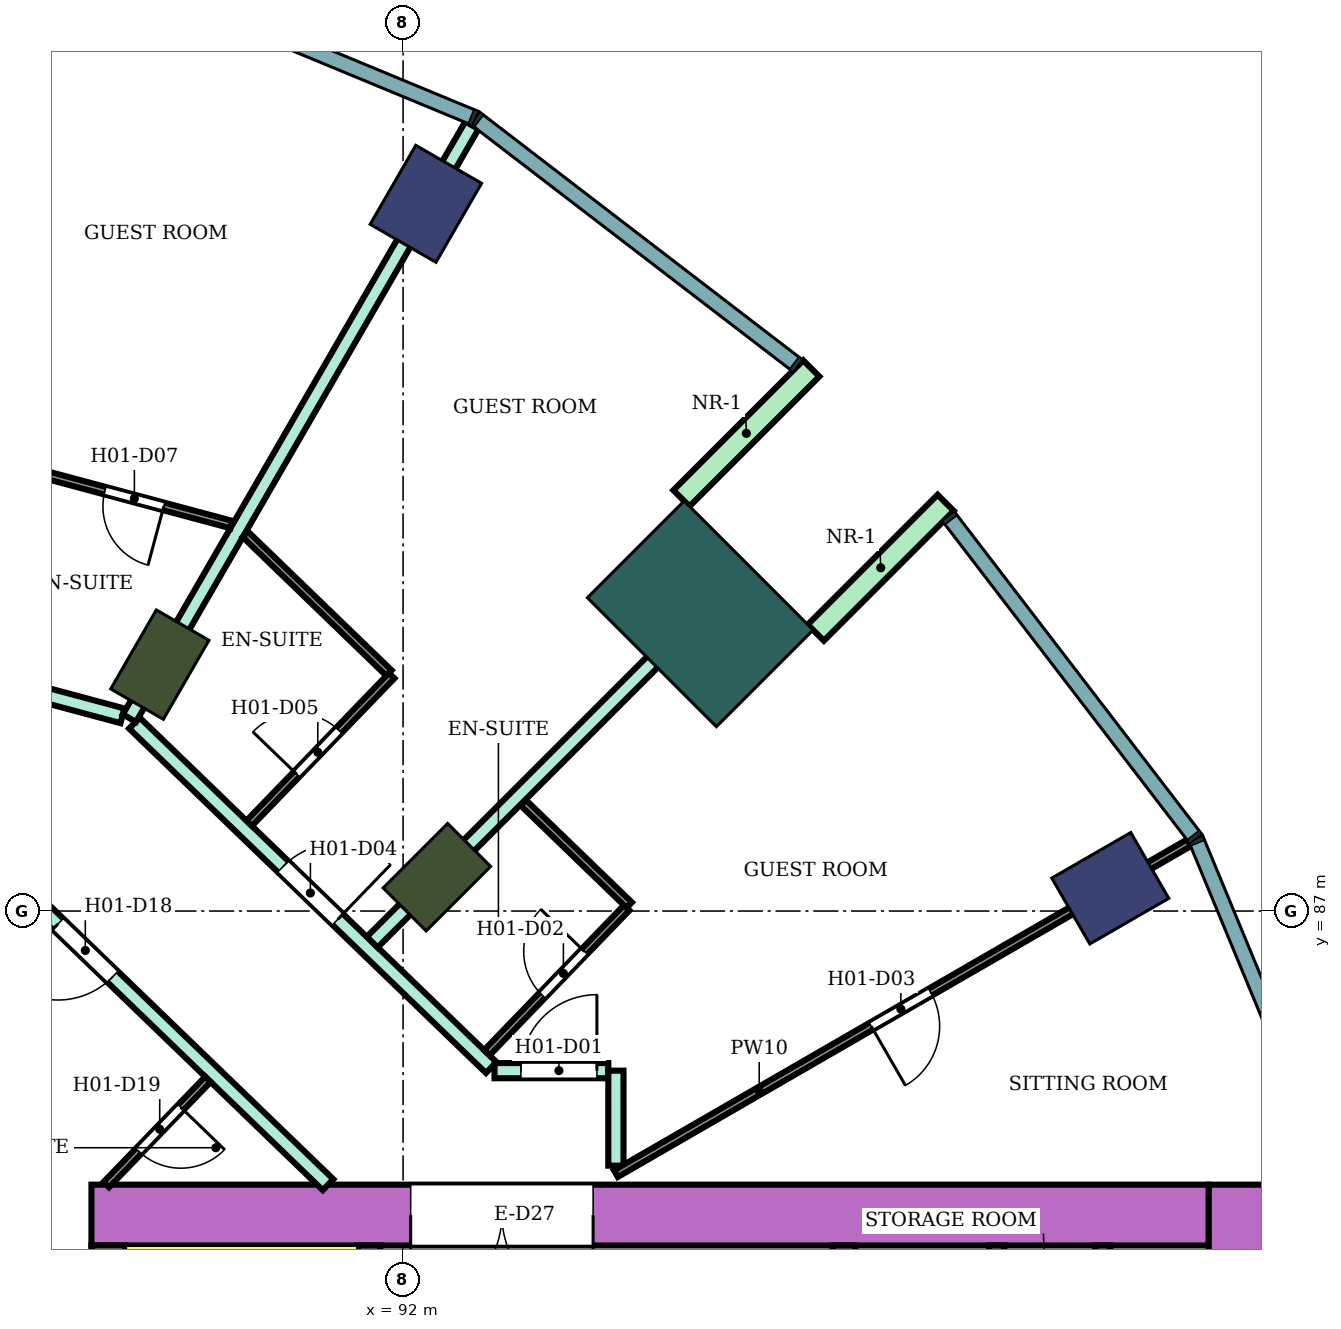
"""IFC4 building model, lengths in metres.
Left out: names, types, materials, properties, quantities, classifications, styles, units other than length and angle.
Written with IfcOpenShell. Run it as: python <this file> out.ifc"""

import sys

from ifc_helpers import new_model, si_unit, direction, frame, frame_2d, origin, origin_2d, place, context, subcontext, project, spatial, rectangle, extrude, element, fill, save


model = new_model("IFC4")
c1 = context("Model", 3, precision=1e-05, world=origin(), true_north=direction((0.0, 1.0)))
c2 = subcontext(c1, "Body", "Model", "MODEL_VIEW")
j1 = project(units=[si_unit("LENGTHUNIT", "METRE"), si_unit("PLANEANGLEUNIT", "RADIAN")], contexts=[c1])
p1 = place(None, origin())
s1 = spatial("IfcSite", under=j1, at=p1, CompositionType="ELEMENT")
p2 = place(p1, origin())
s2 = spatial("IfcBuilding", under=s1, at=p2, CompositionType="ELEMENT")
p3 = place(p2, frame((0.0, 0.0, 36.4)))
s3 = spatial("IfcBuildingStorey", under=s2, at=p3, CompositionType="ELEMENT", Elevation=36.4)
for number, where, z_axis, x_axis in (
    (1, (101.304, 87.3, 0.0), (0.0, 0.0, 1.0), (0.866, 0.5, 0.0)),
    (2, (92.3, 96.304, 0.0), (0.0, 0.0, 1.0), (0.5, 0.866, 0.0)),
):
    element("IfcColumn", number, at=place(p3, frame(where, z_axis=z_axis, x_axis=x_axis)), inside=s3, PredefinedType="COLUMN", context=c2, shape_type="SweptSolid", body=[
        extrude(rectangle(XDim=1.2, YDim=1.0, at=origin_2d()), origin(), (0.0, 0.0, 1.0), 3.8),
    ])
for number, where, z_axis, x_axis in (
    (3, (92.445, 87.445, 0.0), (0.0, 0.0, 1.0), (0.707, 0.707, 0.0)),
    (4, (88.8, 90.242, 0.0), (0.0, 0.0, 1.0), (0.5, 0.866, 0.0)),
):
    element("IfcColumn", number, at=place(p3, frame(where, z_axis=z_axis, x_axis=x_axis)), inside=s3, PredefinedType="COLUMN", context=c2, shape_type="SweptSolid", body=[
        extrude(rectangle(XDim=1.2, YDim=0.8, at=origin_2d()), origin(), (0.0, 0.0, 1.0), 3.8),
    ])
p4 = place(p3, frame((95.91, 90.91, 0.0), z_axis=(0.0, 0.0, 1.0), x_axis=(0.707106781187, 0.707106781187, 0.0)))
e5 = element("IfcColumn", 5, at=p4, inside=s3, PredefinedType="COLUMN", context=c2, shape_type="SweptSolid", body=[
    extrude(rectangle(XDim=1.8, YDim=2.4, at=origin_2d()), origin(), (0.0, 0.0, 1.0), 3.8),
])
p5 = place(p3, frame((87.9, 83.0, 0.0), z_axis=(0.0, 0.0, 1.0), x_axis=(1.0, 0.0, 0.0)))
e6 = element("IfcWall", 6, at=p5, inside=s3, PredefinedType="SHEAR", context=c2, shape_type="SweptSolid", body=[
    extrude(rectangle(XDim=14.7, YDim=0.8, at=frame_2d((7.35, 0.0))), origin(), (0.0, 0.0, 1.0), 3.48),
])
p6 = place(p5, frame((4.2, 0.0, 0.0)))
e7 = element("IfcOpeningElement", 7, at=p6, cuts=e6, PredefinedType="OPENING", context=c2, shape_type="SweptSolid", body=[
    extrude(rectangle(XDim=2.4, YDim=2.4, at=frame_2d((1.2, 1.2))), frame((0.0, 0.41, 0.0), z_axis=(0.0, -1.0, 0.0), x_axis=(1.0, 0.0, 0.0)), (0.0, 0.0, 1.0), 0.82),
])
p7 = place(p3, frame((88.125, 75.0, 0.0), z_axis=(0.0, 0.0, 1.0), x_axis=(0.0, 1.0, 0.0)))
e8 = element("IfcWall", 8, at=p7, inside=s3, PredefinedType="SHEAR", context=c2, shape_type="SweptSolid", body=[
    extrude(rectangle(XDim=7.6, YDim=0.45, at=frame_2d((3.8, 0.0))), origin(), (0.0, 0.0, 1.0), 3.48),
])
p8 = place(p3, frame((103.0, 66.6, 0.0), z_axis=(0.0, 0.0, 1.0), x_axis=(0.0, 1.0, 0.0)))
e9 = element("IfcWall", 9, at=p8, inside=s3, PredefinedType="SHEAR", context=c2, shape_type="SweptSolid", body=[
    extrude(rectangle(XDim=16.8, YDim=0.8, at=frame_2d((8.4, 0.0))), origin(), (0.0, 0.0, 1.0), 3.48),
])
p9 = place(p3, frame((91.55, 75.0, 0.0), z_axis=(0.0, 0.0, 1.0), x_axis=(0.0, 1.0, 0.0)))
e10 = element("IfcWall", 10, at=p9, inside=s3, PredefinedType="SHEAR", context=c2, shape_type="SweptSolid", body=[
    extrude(rectangle(XDim=7.6, YDim=0.3, at=frame_2d((3.8, 0.0))), origin(), (0.0, 0.0, 1.0), 3.48),
])
p10 = place(p9, frame((1.85, 0.0, 0.0)))
e11 = element("IfcOpeningElement", 11, at=p10, cuts=e10, PredefinedType="OPENING", context=c2, shape_type="SweptSolid", body=[
    extrude(rectangle(XDim=0.9, YDim=2.1, at=frame_2d((0.45, 1.05))), frame((0.0, 0.16, 0.0), z_axis=(0.0, -1.0, 0.0), x_axis=(1.0, 0.0, 0.0)), (0.0, 0.0, 1.0), 0.32),
])
p11 = place(p3, frame((97.8, 78.6, 0.0), z_axis=(0.0, 0.0, 1.0), x_axis=(0.0, 1.0, 0.0)))
e12 = element("IfcWall", 12, at=p11, inside=s3, PredefinedType="SHEAR", context=c2, shape_type="SweptSolid", body=[
    extrude(rectangle(XDim=4.0, YDim=0.3, at=frame_2d((2.0, 0.0))), origin(), (0.0, 0.0, 1.0), 3.48),
])
for number, where, z_axis, x_axis in (
    (13, (97.43, 90.662, 0.0), (0.0, 0.0, 1.0), (0.707, 0.707, 0.0)),
    (14, (95.662, 92.43, 0.0), (0.0, 0.0, 1.0), (0.707, 0.707, 0.0)),
):
    element("IfcWall", number, at=place(p3, frame(where, z_axis=z_axis, x_axis=x_axis)), inside=s3, PredefinedType="NOTDEFINED", context=c2, shape_type="SweptSolid", body=[
        extrude(rectangle(XDim=2.416, YDim=0.3, at=frame_2d((1.208, 0.0))), origin(), (0.0, 0.0, 1.0), 3.8),
    ])
p12 = place(p3, frame((80.0, 91.797, 0.0), z_axis=(0.0, 0.0, 1.0), x_axis=(0.965857042792, -0.259075612301, 0.0)))
e15 = element("IfcWall", 15, at=p12, inside=s3, PredefinedType="PARTITIONING", context=c2, shape_type="SweptSolid", body=[
    extrude(rectangle(XDim=8.602, YDim=0.2, at=frame_2d((4.301, 0.0))), origin(), (0.0, 0.0, 1.0), 3.35),
])
p13 = place(p12, frame((4.877, 0.0, 0.0)))
e16 = element("IfcOpeningElement", 16, at=p13, cuts=e15, PredefinedType="OPENING", context=c2, shape_type="SweptSolid", body=[
    extrude(rectangle(XDim=1.0, YDim=2.1, at=frame_2d((0.5, 1.05))), frame((0.0, 0.11, 0.0), z_axis=(0.0, -1.0, 0.0), x_axis=(1.0, 0.0, 0.0)), (0.0, 0.0, 1.0), 0.22),
])
p14 = place(p12, frame((2.73, 0.0, 0.0)))
e17 = element("IfcOpeningElement", 17, at=p14, cuts=e15, PredefinedType="OPENING", context=c2, shape_type="SweptSolid", body=[
    extrude(rectangle(XDim=1.1, YDim=2.1, at=frame_2d((0.55, 1.05))), frame((0.0, 0.11, 0.0), z_axis=(0.0, -1.0, 0.0), x_axis=(1.0, 0.0, 0.0)), (0.0, 0.0, 1.0), 0.22),
])
p15 = place(p3, frame((87.064, 87.211, 0.0), z_axis=(0.0, 0.0, 1.0), x_axis=(0.719540958932, -0.694450004262, 0.0)))
e18 = element("IfcWall", 18, at=p15, inside=s3, PredefinedType="PARTITIONING", context=c2, shape_type="SweptSolid", body=[
    extrude(rectangle(XDim=5.488, YDim=0.2, at=frame_2d((2.744, 0.0))), origin(), (0.0, 0.0, 1.0), 3.35),
])
p16 = place(p15, frame((0.55, 0.0, 0.0)))
e19 = element("IfcOpeningElement", 19, at=p16, cuts=e18, PredefinedType="OPENING", context=c2, shape_type="SweptSolid", body=[
    extrude(rectangle(XDim=1.0, YDim=2.1, at=frame_2d((0.5, 1.05))), frame((0.0, 0.11, 0.0), z_axis=(0.0, -1.0, 0.0), x_axis=(1.0, 0.0, 0.0)), (0.0, 0.0, 1.0), 0.22),
])
p17 = place(p3, frame((88.465, 89.473, 0.0), z_axis=(0.0, 0.0, 1.0), x_axis=(0.719457552421, -0.694536413922, 0.0)))
e20 = element("IfcWall", 20, at=p17, inside=s3, PredefinedType="PARTITIONING", context=c2, shape_type="SweptSolid", body=[
    extrude(rectangle(XDim=6.524, YDim=0.2, at=frame_2d((3.262, 0.0))), origin(), (0.0, 0.0, 1.0), 3.35),
])
p18 = place(p17, frame((2.719, 0.0, 0.0)))
e21 = element("IfcOpeningElement", 21, at=p18, cuts=e20, PredefinedType="OPENING", context=c2, shape_type="SweptSolid", body=[
    extrude(rectangle(XDim=1.0, YDim=2.1, at=frame_2d((0.5, 1.05))), frame((0.0, 0.11, 0.0), z_axis=(0.0, -1.0, 0.0), x_axis=(1.0, 0.0, 0.0)), (0.0, 0.0, 1.0), 0.22),
])
p19 = place(p3, frame((88.4, 89.538, 0.0), z_axis=(0.0, 0.0, 1.0), x_axis=(0.5002401188, 0.865886726739, 0.0)))
e22 = element("IfcWall", 22, at=p19, inside=s3, PredefinedType="PARTITIONING", context=c2, shape_type="SweptSolid", body=[
    extrude(rectangle(XDim=9.008, YDim=0.2, at=frame_2d((4.504, 0.0))), origin(), (0.0, 0.0, 1.0), 3.35),
])
p20 = place(p3, frame((91.594, 86.591, 0.0), z_axis=(0.0, 0.0, 1.0), x_axis=(0.707214399597, 0.706999146394, 0.0)))
e23 = element("IfcWall", 23, at=p20, inside=s3, PredefinedType="PARTITIONING", context=c2, shape_type="SweptSolid", body=[
    extrude(rectangle(XDim=6.805, YDim=0.2, at=frame_2d((3.403, 0.0))), origin(), (0.0, 0.0, 1.0), 3.35),
])
p21 = place(p3, frame((93.203, 84.9, 0.0), z_axis=(0.0, 0.0, 1.0), x_axis=(1.0, 0.0, 0.0)))
e24 = element("IfcWall", 24, at=p21, inside=s3, PredefinedType="PARTITIONING", context=c2, shape_type="SweptSolid", body=[
    extrude(rectangle(XDim=1.497, YDim=0.2, at=frame_2d((0.749, 0.0))), origin(), (0.0, 0.0, 1.0), 3.35),
])
p22 = place(p21, frame((0.347, 0.0, 0.0)))
e25 = element("IfcOpeningElement", 25, at=p22, cuts=e24, PredefinedType="OPENING", context=c2, shape_type="SweptSolid", body=[
    extrude(rectangle(XDim=1.0, YDim=2.1, at=frame_2d((0.5, 1.05))), frame((0.0, 0.11, 0.0), z_axis=(0.0, -1.0, 0.0), x_axis=(1.0, 0.0, 0.0)), (0.0, 0.0, 1.0), 0.22),
])
p23 = place(p3, frame((94.8, 83.65, 0.0), z_axis=(0.0, 0.0, 1.0), x_axis=(0.0, 1.0, 0.0)))
e26 = element("IfcWall", 26, at=p23, inside=s3, PredefinedType="PARTITIONING", context=c2, shape_type="SweptSolid", body=[
    extrude(rectangle(XDim=1.25, YDim=0.2, at=frame_2d((0.625, 0.0))), origin(), (0.0, 0.0, 1.0), 3.35),
])
p24 = place(p3, frame((87.082, 92.797, 0.0), z_axis=(0.0, 0.0, 1.0), x_axis=(0.965926679745, -0.258815859939, 0.0)))
e27 = element("IfcWall", 27, at=p24, inside=s3, PredefinedType="PARTITIONING", context=c2, shape_type="SweptSolid", body=[
    extrude(rectangle(XDim=2.753, YDim=0.1, at=frame_2d((1.377, 0.0))), origin(), (0.0, 0.0, 1.0), 3.35),
])
p25 = place(p24, frame((1.032, 0.0, 0.0)))
e28 = element("IfcOpeningElement", 28, at=p25, cuts=e27, PredefinedType="OPENING", context=c2, shape_type="SweptSolid", body=[
    extrude(rectangle(XDim=0.8, YDim=2.1, at=frame_2d((0.4, 1.05))), frame((0.0, 0.06, 0.0), z_axis=(0.0, -1.0, 0.0), x_axis=(1.0, 0.0, 0.0)), (0.0, 0.0, 1.0), 0.12),
])
p26 = place(p3, frame((88.095, 83.4, 0.0), z_axis=(0.0, 0.0, 1.0), x_axis=(0.694447472534, 0.719543402368, 0.0)))
e29 = element("IfcWall", 29, at=p26, inside=s3, PredefinedType="PARTITIONING", context=c2, shape_type="SweptSolid", body=[
    extrude(rectangle(XDim=1.926, YDim=0.1, at=frame_2d((0.963, 0.0))), origin(), (0.0, 0.0, 1.0), 3.35),
])
p27 = place(p26, frame((0.613, 0.0, 0.0)))
e30 = element("IfcOpeningElement", 30, at=p27, cuts=e29, PredefinedType="OPENING", context=c2, shape_type="SweptSolid", body=[
    extrude(rectangle(XDim=0.8, YDim=2.1, at=frame_2d((0.4, 1.05))), frame((0.0, 0.06, 0.0), z_axis=(0.0, -1.0, 0.0), x_axis=(1.0, 0.0, 0.0)), (0.0, 0.0, 1.0), 0.12),
])
p28 = place(p3, frame((89.925, 91.956, 0.0), z_axis=(0.0, 0.0, 1.0), x_axis=(0.71935982196, -0.694637636865, 0.0)))
e31 = element("IfcWall", 31, at=p28, inside=s3, PredefinedType="PARTITIONING", context=c2, shape_type="SweptSolid", body=[
    extrude(rectangle(XDim=2.627, YDim=0.1, at=frame_2d((1.313, 0.0))), origin(), (0.0, 0.0, 1.0), 3.35),
])
p29 = place(p3, frame((89.976, 88.154, 0.0), z_axis=(0.0, 0.0, 1.0), x_axis=(0.6945137956, 0.719479386585, 0.0)))
e32 = element("IfcWall", 32, at=p29, inside=s3, PredefinedType="PARTITIONING", context=c2, shape_type="SweptSolid", body=[
    extrude(rectangle(XDim=2.699, YDim=0.1, at=frame_2d((1.35, 0.0))), origin(), (0.0, 0.0, 1.0), 3.35),
])
p30 = place(p29, frame((0.9, 0.0, 0.0)))
e33 = element("IfcOpeningElement", 33, at=p30, cuts=e32, PredefinedType="OPENING", context=c2, shape_type="SweptSolid", body=[
    extrude(rectangle(XDim=0.8, YDim=2.1, at=frame_2d((0.4, 1.05))), frame((0.0, 0.06, 0.0), z_axis=(0.0, -1.0, 0.0), x_axis=(1.0, 0.0, 0.0)), (0.0, 0.0, 1.0), 0.12),
])
p31 = place(p3, frame((93.103, 85.136, 0.0), z_axis=(0.0, 0.0, 1.0), x_axis=(0.694324808789, 0.719661767708, 0.0)))
e34 = element("IfcWall", 34, at=p31, inside=s3, PredefinedType="PARTITIONING", context=c2, shape_type="SweptSolid", body=[
    extrude(rectangle(XDim=2.65, YDim=0.1, at=frame_2d((1.325, 0.0))), origin(), (0.0, 0.0, 1.0), 3.35),
])
p32 = place(p31, frame((1.05, 0.0, 0.0)))
e35 = element("IfcOpeningElement", 35, at=p32, cuts=e34, PredefinedType="OPENING", context=c2, shape_type="SweptSolid", body=[
    extrude(rectangle(XDim=0.8, YDim=2.1, at=frame_2d((0.4, 1.05))), frame((0.0, 0.06, 0.0), z_axis=(0.0, -1.0, 0.0), x_axis=(1.0, 0.0, 0.0)), (0.0, 0.0, 1.0), 0.12),
])
p33 = place(p3, frame((93.581, 88.425, 0.0), z_axis=(0.0, 0.0, 1.0), x_axis=(0.719336381931, -0.694661910307, 0.0)))
e36 = element("IfcWall", 36, at=p33, inside=s3, PredefinedType="PARTITIONING", context=c2, shape_type="SweptSolid", body=[
    extrude(rectangle(XDim=1.939, YDim=0.1, at=frame_2d((0.97, 0.0))), origin(), (0.0, 0.0, 1.0), 3.35),
])
p34 = place(p3, frame((94.8, 83.545, 0.0), z_axis=(0.0, 0.0, 1.0), x_axis=(0.86602264145, 0.500004784474, 0.0)))
e37 = element("IfcWall", 37, at=p34, inside=s3, PredefinedType="PARTITIONING", context=c2, shape_type="SweptSolid", body=[
    extrude(rectangle(XDim=8.708, YDim=0.1, at=frame_2d((4.354, 0.0))), origin(), (0.0, 0.0, 1.0), 3.35),
])
p35 = place(p34, frame((3.879, 0.0, 0.0)))
e38 = element("IfcOpeningElement", 38, at=p35, cuts=e37, PredefinedType="OPENING", context=c2, shape_type="SweptSolid", body=[
    extrude(rectangle(XDim=0.9, YDim=2.1, at=frame_2d((0.45, 1.05))), frame((0.0, 0.06, 0.0), z_axis=(0.0, -1.0, 0.0), x_axis=(1.0, 0.0, 0.0)), (0.0, 0.0, 1.0), 0.12),
])
for number, where, z_axis, x_axis in (
    (39, (99.81, 78.9, 0.0), (0.0, 0.0, 1.0), (0.0, 1.0, 0.0)),
    (40, (101.205, 78.9, 0.0), (0.0, 0.0, 1.0), (0.0, 1.0, 0.0)),
):
    element("IfcWall", number, at=place(p3, frame(where, z_axis=z_axis, x_axis=x_axis)), inside=s3, PredefinedType="PARTITIONING", context=c2, shape_type="SweptSolid", body=[
        extrude(rectangle(XDim=3.7, YDim=0.2, at=frame_2d((1.85, 0.0))), origin(), (0.0, 0.0, 1.0), 3.48),
    ])
p36 = place(p22, origin())
e41 = element("IfcDoor", 41, at=p36, inside=s3, OperationType="SINGLE_SWING_RIGHT", PredefinedType="DOOR", context=c2, shape_type="SweptSolid", body=[
    extrude(rectangle(XDim=1.0, YDim=2.1, at=frame_2d((0.5, 1.05))), frame((0.0, 0.025, 0.0), z_axis=(0.0, -1.0, 0.0), x_axis=(1.0, 0.0, 0.0)), (0.0, 0.0, 1.0), 0.05),
])
fill(e25, e41)
p37 = place(p32, origin())
e42 = element("IfcDoor", 42, at=p37, inside=s3, OperationType="SINGLE_SWING_RIGHT", PredefinedType="DOOR", context=c2, shape_type="SweptSolid", body=[
    extrude(rectangle(XDim=0.8, YDim=2.1, at=frame_2d((0.4, 1.05))), frame((0.0, 0.025, 0.0), z_axis=(0.0, -1.0, 0.0), x_axis=(1.0, 0.0, 0.0)), (0.0, 0.0, 1.0), 0.05),
])
fill(e35, e42)
p38 = place(p35, frame((0.9, 0.0, 0.0), z_axis=(0.0, 0.0, 1.0), x_axis=(-1.0, 0.0, 0.0)))
e43 = element("IfcDoor", 43, at=p38, inside=s3, OperationType="SINGLE_SWING_RIGHT", PredefinedType="DOOR", context=c2, shape_type="SweptSolid", body=[
    extrude(rectangle(XDim=0.9, YDim=2.1, at=frame_2d((0.45, 1.05))), frame((0.0, 0.025, 0.0), z_axis=(0.0, -1.0, 0.0), x_axis=(1.0, 0.0, 0.0)), (0.0, 0.0, 1.0), 0.05),
])
fill(e38, e43)
p39 = place(p18, origin())
e44 = element("IfcDoor", 44, at=p39, inside=s3, OperationType="SINGLE_SWING_RIGHT", PredefinedType="DOOR", context=c2, shape_type="SweptSolid", body=[
    extrude(rectangle(XDim=1.0, YDim=2.1, at=frame_2d((0.5, 1.05))), frame((0.0, 0.025, 0.0), z_axis=(0.0, -1.0, 0.0), x_axis=(1.0, 0.0, 0.0)), (0.0, 0.0, 1.0), 0.05),
])
fill(e21, e44)
p40 = place(p30, origin())
e45 = element("IfcDoor", 45, at=p40, inside=s3, OperationType="SINGLE_SWING_LEFT", PredefinedType="DOOR", context=c2, shape_type="SweptSolid", body=[
    extrude(rectangle(XDim=0.8, YDim=2.1, at=frame_2d((0.4, 1.05))), frame((0.0, 0.025, 0.0), z_axis=(0.0, -1.0, 0.0), x_axis=(1.0, 0.0, 0.0)), (0.0, 0.0, 1.0), 0.05),
])
fill(e33, e45)
p41 = place(p25, frame((0.8, 0.0, 0.0), z_axis=(0.0, 0.0, 1.0), x_axis=(-1.0, 0.0, 0.0)))
e46 = element("IfcDoor", 46, at=p41, inside=s3, OperationType="SINGLE_SWING_LEFT", PredefinedType="DOOR", context=c2, shape_type="SweptSolid", body=[
    extrude(rectangle(XDim=0.8, YDim=2.1, at=frame_2d((0.4, 1.05))), frame((0.0, 0.025, 0.0), z_axis=(0.0, -1.0, 0.0), x_axis=(1.0, 0.0, 0.0)), (0.0, 0.0, 1.0), 0.05),
])
fill(e28, e46)
p42 = place(p16, frame((1.0, 0.0, 0.0), z_axis=(0.0, 0.0, 1.0), x_axis=(-1.0, 0.0, 0.0)))
e47 = element("IfcDoor", 47, at=p42, inside=s3, OperationType="SINGLE_SWING_RIGHT", PredefinedType="DOOR", context=c2, shape_type="SweptSolid", body=[
    extrude(rectangle(XDim=1.0, YDim=2.1, at=frame_2d((0.5, 1.05))), frame((0.0, 0.025, 0.0), z_axis=(0.0, -1.0, 0.0), x_axis=(1.0, 0.0, 0.0)), (0.0, 0.0, 1.0), 0.05),
])
fill(e19, e47)
p43 = place(p27, frame((0.8, 0.0, 0.0), z_axis=(0.0, 0.0, 1.0), x_axis=(-1.0, 0.0, 0.0)))
e48 = element("IfcDoor", 48, at=p43, inside=s3, OperationType="SINGLE_SWING_LEFT", PredefinedType="DOOR", context=c2, shape_type="SweptSolid", body=[
    extrude(rectangle(XDim=0.8, YDim=2.1, at=frame_2d((0.4, 1.05))), frame((0.0, 0.025, 0.0), z_axis=(0.0, -1.0, 0.0), x_axis=(1.0, 0.0, 0.0)), (0.0, 0.0, 1.0), 0.05),
])
fill(e30, e48)
p44 = place(p6, frame((2.4, 0.0, 0.0), z_axis=(0.0, 0.0, 1.0), x_axis=(-1.0, 0.0, 0.0)))
e49 = element("IfcDoor", 49, at=p44, inside=s3, OperationType="DOUBLE_DOOR_SINGLE_SWING", PredefinedType="DOOR", context=c2, shape_type="SweptSolid", body=[
    extrude(rectangle(XDim=2.4, YDim=2.4, at=frame_2d((1.2, 1.2))), frame((0.0, 0.025, 0.0), z_axis=(0.0, -1.0, 0.0), x_axis=(1.0, 0.0, 0.0)), (0.0, 0.0, 1.0), 0.05),
])
fill(e7, e49)
save(model, sys.argv[1])
